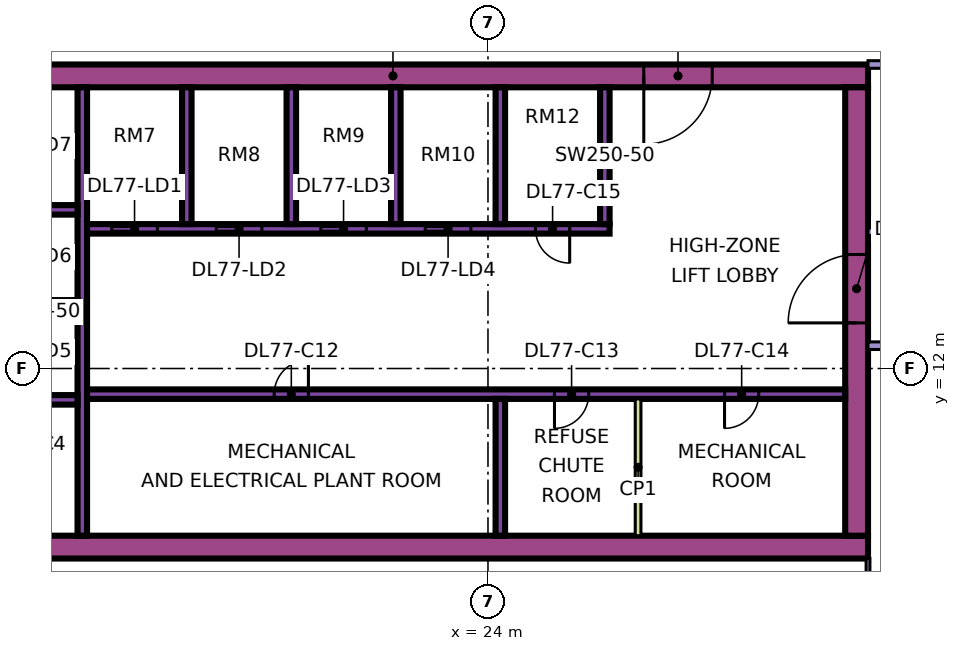
"""IFC4 building model, lengths in metres.
Left out: names, types, materials, properties, quantities, classifications, styles, units other than length and angle.
Written with IfcOpenShell. Run it as: python <this file> out.ifc"""

import sys

from ifc_helpers import new_model, si_unit, direction, frame, frame_2d, origin, place, context, subcontext, project, spatial, rectangle, extrude, element, fill, save


model = new_model("IFC4")
c1 = context("Model", 3, precision=1e-05, world=origin(), true_north=direction((0.0, 1.0)))
c2 = subcontext(c1, "Body", "Model", "MODEL_VIEW")
j1 = project(units=[si_unit("LENGTHUNIT", "METRE"), si_unit("PLANEANGLEUNIT", "RADIAN")], contexts=[c1])
p1 = place(None, origin())
s1 = spatial("IfcSite", under=j1, at=p1, CompositionType="ELEMENT")
p2 = place(p1, origin())
s2 = spatial("IfcBuilding", under=s1, at=p2, CompositionType="ELEMENT")
p3 = place(p2, frame((0.0, 0.0, 327.65)))
s3 = spatial("IfcBuildingStorey", under=s2, at=p3, CompositionType="ELEMENT", Elevation=327.65)
p4 = place(p3, frame((9.0, 7.3, 0.0), z_axis=(0.0, 0.0, 1.0), x_axis=(1.0, 0.0, 0.0)))
e1 = element("IfcWall", 1, at=p4, inside=s3, PredefinedType="SHEAR", context=c2, shape_type="SweptSolid", body=[
    extrude(rectangle(XDim=25.0, YDim=0.6, at=frame_2d((12.5, 0.0))), origin(), (0.0, 0.0, 1.0), 11.25),
])
p5 = place(p3, frame((9.0, 19.7, 0.0), z_axis=(0.0, 0.0, 1.0), x_axis=(1.0, 0.0, 0.0)))
e2 = element("IfcWall", 2, at=p5, inside=s3, PredefinedType="SHEAR", context=c2, shape_type="SweptSolid", body=[
    extrude(rectangle(XDim=25.0, YDim=0.6, at=frame_2d((12.5, 0.0))), origin(), (0.0, 0.0, 1.0), 11.25),
])
p6 = place(p5, frame((19.1, 0.0, 0.0)))
e3 = element("IfcOpeningElement", 3, at=p6, cuts=e2, PredefinedType="OPENING", context=c2, shape_type="SweptSolid", body=[
    extrude(rectangle(XDim=1.8, YDim=2.4, at=frame_2d((0.9, 1.2))), frame((0.0, 0.31, 0.0), z_axis=(0.0, -1.0, 0.0), x_axis=(1.0, 0.0, 0.0)), (0.0, 0.0, 1.0), 0.62),
])
p7 = place(p3, frame((33.7, 7.6, 0.0), z_axis=(0.0, 0.0, 1.0), x_axis=(0.0, 1.0, 0.0)))
e4 = element("IfcWall", 4, at=p7, inside=s3, PredefinedType="SHEAR", context=c2, shape_type="SweptSolid", body=[
    extrude(rectangle(XDim=11.8, YDim=0.6, at=frame_2d((5.9, 0.0))), origin(), (0.0, 0.0, 1.0), 11.25),
])
p8 = place(p7, frame((5.6, 0.0, 0.0)))
e5 = element("IfcOpeningElement", 5, at=p8, cuts=e4, PredefinedType="OPENING", context=c2, shape_type="SweptSolid", body=[
    extrude(rectangle(XDim=1.8, YDim=2.4, at=frame_2d((0.9, 1.2))), frame((0.0, 0.31, 0.0), z_axis=(0.0, -1.0, 0.0), x_axis=(1.0, 0.0, 0.0)), (0.0, 0.0, 1.0), 0.62),
])
p9 = place(p3, frame((13.325, 7.6, 0.0), z_axis=(0.0, 0.0, 1.0), x_axis=(0.0, 1.0, 0.0)))
e6 = element("IfcWall", 6, at=p9, inside=s3, PredefinedType="SHEAR", context=c2, shape_type="SweptSolid", body=[
    extrude(rectangle(XDim=11.8, YDim=0.25, at=frame_2d((5.9, 0.0))), origin(), (0.0, 0.0, 1.0), 11.25),
])
p10 = place(p3, frame((13.45, 11.325, 0.0), z_axis=(0.0, 0.0, 1.0), x_axis=(1.0, 0.0, 0.0)))
e7 = element("IfcWall", 7, at=p10, inside=s3, PredefinedType="SHEAR", context=c2, shape_type="SweptSolid", body=[
    extrude(rectangle(XDim=19.95, YDim=0.25, at=frame_2d((9.975, 0.0))), origin(), (0.0, 0.0, 1.0), 11.25),
])
p11 = place(p10, frame((4.925, 0.0, 0.0)))
e8 = element("IfcOpeningElement", 8, at=p11, cuts=e7, PredefinedType="OPENING", context=c2, shape_type="SweptSolid", body=[
    extrude(rectangle(XDim=0.9, YDim=2.1, at=frame_2d((0.45, 1.05))), frame((0.0, 0.135, 0.0), z_axis=(0.0, -1.0, 0.0), x_axis=(1.0, 0.0, 0.0)), (0.0, 0.0, 1.0), 0.27),
])
p12 = place(p10, frame((12.3, 0.0, 0.0)))
e9 = element("IfcOpeningElement", 9, at=p12, cuts=e7, PredefinedType="OPENING", context=c2, shape_type="SweptSolid", body=[
    extrude(rectangle(XDim=0.9, YDim=2.1, at=frame_2d((0.45, 1.05))), frame((0.0, 0.135, 0.0), z_axis=(0.0, -1.0, 0.0), x_axis=(1.0, 0.0, 0.0)), (0.0, 0.0, 1.0), 0.27),
])
p13 = place(p10, frame((16.775, 0.0, 0.0)))
e10 = element("IfcOpeningElement", 10, at=p13, cuts=e7, PredefinedType="OPENING", context=c2, shape_type="SweptSolid", body=[
    extrude(rectangle(XDim=0.9, YDim=2.1, at=frame_2d((0.45, 1.05))), frame((0.0, 0.135, 0.0), z_axis=(0.0, -1.0, 0.0), x_axis=(1.0, 0.0, 0.0)), (0.0, 0.0, 1.0), 0.27),
])
p14 = place(p3, frame((13.45, 15.675, 0.0), z_axis=(0.0, 0.0, 1.0), x_axis=(1.0, 0.0, 0.0)))
e11 = element("IfcWall", 11, at=p14, inside=s3, PredefinedType="SHEAR", context=c2, shape_type="SweptSolid", body=[
    extrude(rectangle(XDim=13.75, YDim=0.25, at=frame_2d((6.875, 0.0))), origin(), (0.0, 0.0, 1.0), 11.25),
])
p15 = place(p14, frame((0.65, 0.0, 0.0)))
e12 = element("IfcOpeningElement", 12, at=p15, cuts=e11, PredefinedType="OPENING", context=c2, shape_type="SweptSolid", body=[
    extrude(rectangle(XDim=1.2, YDim=2.2, at=frame_2d((0.6, 1.1))), frame((0.0, 0.135, 0.0), z_axis=(0.0, -1.0, 0.0), x_axis=(1.0, 0.0, 0.0)), (0.0, 0.0, 1.0), 0.27),
])
p16 = place(p14, frame((3.4, 0.0, 0.0)))
e13 = element("IfcOpeningElement", 13, at=p16, cuts=e11, PredefinedType="OPENING", context=c2, shape_type="SweptSolid", body=[
    extrude(rectangle(XDim=1.2, YDim=2.2, at=frame_2d((0.6, 1.1))), frame((0.0, 0.135, 0.0), z_axis=(0.0, -1.0, 0.0), x_axis=(1.0, 0.0, 0.0)), (0.0, 0.0, 1.0), 0.27),
])
p17 = place(p14, frame((6.15, 0.0, 0.0)))
e14 = element("IfcOpeningElement", 14, at=p17, cuts=e11, PredefinedType="OPENING", context=c2, shape_type="SweptSolid", body=[
    extrude(rectangle(XDim=1.2, YDim=2.2, at=frame_2d((0.6, 1.1))), frame((0.0, 0.135, 0.0), z_axis=(0.0, -1.0, 0.0), x_axis=(1.0, 0.0, 0.0)), (0.0, 0.0, 1.0), 0.27),
])
p18 = place(p14, frame((8.9, 0.0, 0.0)))
e15 = element("IfcOpeningElement", 15, at=p18, cuts=e11, PredefinedType="OPENING", context=c2, shape_type="SweptSolid", body=[
    extrude(rectangle(XDim=1.2, YDim=2.2, at=frame_2d((0.6, 1.1))), frame((0.0, 0.135, 0.0), z_axis=(0.0, -1.0, 0.0), x_axis=(1.0, 0.0, 0.0)), (0.0, 0.0, 1.0), 0.27),
])
p19 = place(p14, frame((11.8, 0.0, 0.0)))
e16 = element("IfcOpeningElement", 16, at=p19, cuts=e11, PredefinedType="OPENING", context=c2, shape_type="SweptSolid", body=[
    extrude(rectangle(XDim=0.9, YDim=2.1, at=frame_2d((0.45, 1.05))), frame((0.0, 0.135, 0.0), z_axis=(0.0, -1.0, 0.0), x_axis=(1.0, 0.0, 0.0)), (0.0, 0.0, 1.0), 0.27),
])
for number, where, z_axis, x_axis in (
    (17, (10.2, 11.175, 0.0), (0.0, 0.0, 1.0), (1.0, 0.0, 0.0)),
    (18, (10.2, 13.675, 0.0), (0.0, 0.0, 1.0), (1.0, 0.0, 0.0)),
    (19, (10.2, 16.175, 0.0), (0.0, 0.0, 1.0), (1.0, 0.0, 0.0)),
):
    element("IfcWall", number, at=place(p3, frame(where, z_axis=z_axis, x_axis=x_axis)), inside=s3, PredefinedType="SHEAR", context=c2, shape_type="SweptSolid", body=[
        extrude(rectangle(XDim=3.0, YDim=0.25, at=frame_2d((1.5, 0.0))), origin(), (0.0, 0.0, 1.0), 11.25),
    ])
for number, where, z_axis, x_axis in (
    (20, (24.325, 7.6, 0.0), (0.0, 0.0, 1.0), (0.0, 1.0, 0.0)),
    (21, (16.075, 15.8, 0.0), (0.0, 0.0, 1.0), (0.0, 1.0, 0.0)),
    (22, (18.825, 15.8, 0.0), (0.0, 0.0, 1.0), (0.0, 1.0, 0.0)),
    (23, (21.575, 15.8, 0.0), (0.0, 0.0, 1.0), (0.0, 1.0, 0.0)),
    (24, (24.325, 15.8, 0.0), (0.0, 0.0, 1.0), (0.0, 1.0, 0.0)),
    (25, (27.075, 15.8, 0.0), (0.0, 0.0, 1.0), (0.0, 1.0, 0.0)),
):
    element("IfcWall", number, at=place(p3, frame(where, z_axis=z_axis, x_axis=x_axis)), inside=s3, PredefinedType="SHEAR", context=c2, shape_type="SweptSolid", body=[
        extrude(rectangle(XDim=3.6, YDim=0.25, at=frame_2d((1.8, 0.0))), origin(), (0.0, 0.0, 1.0), 11.25),
    ])
p20 = place(p3, frame((-1.447, 12.553, 0.0), z_axis=(0.0, 0.0, 1.0), x_axis=(0.707106781187, -0.707106781187, 0.0)))
e26 = element("IfcWall", 26, at=p20, inside=s3, PredefinedType="SOLIDWALL", context=c2, shape_type="SweptSolid", body=[
    extrude(rectangle(XDim=19.799, YDim=0.15, at=frame_2d((9.899, 0.0))), origin(), (0.0, 0.0, 1.0), 10.85),
])
p21 = place(p20, frame((8.399, 0.0, 0.45)))
e27 = element("IfcOpeningElement", 27, at=p21, cuts=e26, PredefinedType="OPENING", context=c2, shape_type="SweptSolid", body=[
    extrude(rectangle(XDim=3.0, YDim=9.8, at=frame_2d((1.5, 4.9))), frame((0.0, 0.085, 0.0), z_axis=(0.0, -1.0, 0.0), x_axis=(1.0, 0.0, 0.0)), (0.0, 0.0, 1.0), 0.17),
])
p22 = place(p3, frame((27.95, 7.6, 0.0), z_axis=(0.0, 0.0, 1.0), x_axis=(0.0, 1.0, 0.0)))
e28 = element("IfcWall", 28, at=p22, inside=s3, PredefinedType="PARTITIONING", context=c2, shape_type="SweptSolid", body=[
    extrude(rectangle(XDim=3.6, YDim=0.15, at=frame_2d((1.8, 0.0))), origin(), (0.0, 0.0, 1.0), 10.85),
])
p23 = place(p3, frame((34.0, 0.0, 0.0), z_axis=(0.0, 0.0, 1.0), x_axis=(0.0, 1.0, 0.0)))
e29 = element("IfcWall", 29, at=p23, inside=s3, PredefinedType="PARTITIONING", context=c2, shape_type="SweptSolid", body=[
    extrude(rectangle(XDim=7.0, YDim=0.1, at=frame_2d((3.5, 0.0))), origin(), (0.0, 0.0, 1.0), 10.85),
])
p24 = place(p3, frame((34.0, 12.6, 0.0), z_axis=(0.0, 0.0, 1.0), x_axis=(1.0, 0.0, 0.0)))
e30 = element("IfcWall", 30, at=p24, inside=s3, PredefinedType="PARTITIONING", context=c2, shape_type="SweptSolid", body=[
    extrude(rectangle(XDim=3.2, YDim=0.2, at=frame_2d((1.6, 0.0))), origin(), (0.0, 0.0, 1.0), 10.85),
])
p25 = place(p3, frame((34.0, 15.6, 0.0), z_axis=(0.0, 0.0, 1.0), x_axis=(1.0, 0.0, 0.0)))
e31 = element("IfcWall", 31, at=p25, inside=s3, PredefinedType="PARTITIONING", context=c2, shape_type="SweptSolid", body=[
    extrude(rectangle(XDim=10.35, YDim=0.2, at=frame_2d((5.175, 0.0))), origin(), (0.0, 0.0, 1.0), 10.85),
])
p26 = place(p25, frame((3.6, 0.0, 0.0)))
e32 = element("IfcOpeningElement", 32, at=p26, cuts=e31, PredefinedType="OPENING", context=c2, shape_type="SweptSolid", body=[
    extrude(rectangle(XDim=1.0, YDim=2.1, at=frame_2d((0.5, 1.05))), frame((0.0, 0.11, 0.0), z_axis=(0.0, -1.0, 0.0), x_axis=(1.0, 0.0, 0.0)), (0.0, 0.0, 1.0), 0.22),
])
p27 = place(p3, frame((34.0, 20.0, 0.0), z_axis=(0.0, 0.0, 1.0), x_axis=(1.0, 0.0, 0.0)))
e33 = element("IfcWall", 33, at=p27, inside=s3, PredefinedType="PARTITIONING", context=c2, shape_type="SweptSolid", body=[
    extrude(rectangle(XDim=1.9, YDim=0.2, at=frame_2d((0.95, 0.0))), origin(), (0.0, 0.0, 1.0), 10.85),
])
p28 = place(p15, origin())
e34 = element("IfcDoor", 34, at=p28, inside=s3, OperationType="DOUBLE_DOOR_SLIDING", PredefinedType="DOOR", context=c2, shape_type="SweptSolid", body=[
    extrude(rectangle(XDim=1.2, YDim=2.2, at=frame_2d((0.6, 1.1))), frame((0.0, 0.025, 0.0), z_axis=(0.0, -1.0, 0.0), x_axis=(1.0, 0.0, 0.0)), (0.0, 0.0, 1.0), 0.05),
])
fill(e12, e34)
p29 = place(p16, origin())
e35 = element("IfcDoor", 35, at=p29, inside=s3, OperationType="DOUBLE_DOOR_SLIDING", PredefinedType="DOOR", context=c2, shape_type="SweptSolid", body=[
    extrude(rectangle(XDim=1.2, YDim=2.2, at=frame_2d((0.6, 1.1))), frame((0.0, 0.025, 0.0), z_axis=(0.0, -1.0, 0.0), x_axis=(1.0, 0.0, 0.0)), (0.0, 0.0, 1.0), 0.05),
])
fill(e13, e35)
p30 = place(p17, origin())
e36 = element("IfcDoor", 36, at=p30, inside=s3, OperationType="DOUBLE_DOOR_SLIDING", PredefinedType="DOOR", context=c2, shape_type="SweptSolid", body=[
    extrude(rectangle(XDim=1.2, YDim=2.2, at=frame_2d((0.6, 1.1))), frame((0.0, 0.025, 0.0), z_axis=(0.0, -1.0, 0.0), x_axis=(1.0, 0.0, 0.0)), (0.0, 0.0, 1.0), 0.05),
])
fill(e14, e36)
p31 = place(p18, origin())
e37 = element("IfcDoor", 37, at=p31, inside=s3, OperationType="DOUBLE_DOOR_SLIDING", PredefinedType="DOOR", context=c2, shape_type="SweptSolid", body=[
    extrude(rectangle(XDim=1.2, YDim=2.2, at=frame_2d((0.6, 1.1))), frame((0.0, 0.025, 0.0), z_axis=(0.0, -1.0, 0.0), x_axis=(1.0, 0.0, 0.0)), (0.0, 0.0, 1.0), 0.05),
])
fill(e15, e37)
p32 = place(p8, origin())
e38 = element("IfcDoor", 38, at=p32, inside=s3, OperationType="DOUBLE_DOOR_SINGLE_SWING", PredefinedType="DOOR", context=c2, shape_type="SweptSolid", body=[
    extrude(rectangle(XDim=1.8, YDim=2.4, at=frame_2d((0.9, 1.2))), frame((0.0, 0.025, 0.0), z_axis=(0.0, -1.0, 0.0), x_axis=(1.0, 0.0, 0.0)), (0.0, 0.0, 1.0), 0.05),
])
fill(e5, e38)
p33 = place(p6, frame((1.8, 0.0, 0.0), z_axis=(0.0, 0.0, 1.0), x_axis=(-1.0, 0.0, 0.0)))
e39 = element("IfcDoor", 39, at=p33, inside=s3, OperationType="DOUBLE_DOOR_SINGLE_SWING", PredefinedType="DOOR", context=c2, shape_type="SweptSolid", body=[
    extrude(rectangle(XDim=1.8, YDim=2.4, at=frame_2d((0.9, 1.2))), frame((0.0, 0.025, 0.0), z_axis=(0.0, -1.0, 0.0), x_axis=(1.0, 0.0, 0.0)), (0.0, 0.0, 1.0), 0.05),
])
fill(e3, e39)
p34 = place(p11, frame((0.9, 0.0, 0.0), z_axis=(0.0, 0.0, 1.0), x_axis=(-1.0, 0.0, 0.0)))
e40 = element("IfcDoor", 40, at=p34, inside=s3, OperationType="SINGLE_SWING_RIGHT", PredefinedType="DOOR", context=c2, shape_type="SweptSolid", body=[
    extrude(rectangle(XDim=0.9, YDim=2.1, at=frame_2d((0.45, 1.05))), frame((0.0, 0.025, 0.0), z_axis=(0.0, -1.0, 0.0), x_axis=(1.0, 0.0, 0.0)), (0.0, 0.0, 1.0), 0.05),
])
fill(e8, e40)
p35 = place(p12, frame((0.9, 0.0, 0.0), z_axis=(0.0, 0.0, 1.0), x_axis=(-1.0, 0.0, 0.0)))
e41 = element("IfcDoor", 41, at=p35, inside=s3, OperationType="SINGLE_SWING_LEFT", PredefinedType="DOOR", context=c2, shape_type="SweptSolid", body=[
    extrude(rectangle(XDim=0.9, YDim=2.1, at=frame_2d((0.45, 1.05))), frame((0.0, 0.025, 0.0), z_axis=(0.0, -1.0, 0.0), x_axis=(1.0, 0.0, 0.0)), (0.0, 0.0, 1.0), 0.05),
])
fill(e9, e41)
p36 = place(p13, frame((0.9, 0.0, 0.0), z_axis=(0.0, 0.0, 1.0), x_axis=(-1.0, 0.0, 0.0)))
e42 = element("IfcDoor", 42, at=p36, inside=s3, OperationType="SINGLE_SWING_LEFT", PredefinedType="DOOR", context=c2, shape_type="SweptSolid", body=[
    extrude(rectangle(XDim=0.9, YDim=2.1, at=frame_2d((0.45, 1.05))), frame((0.0, 0.025, 0.0), z_axis=(0.0, -1.0, 0.0), x_axis=(1.0, 0.0, 0.0)), (0.0, 0.0, 1.0), 0.05),
])
fill(e10, e42)
p37 = place(p19, origin())
e43 = element("IfcDoor", 43, at=p37, inside=s3, OperationType="SINGLE_SWING_RIGHT", PredefinedType="DOOR", context=c2, shape_type="SweptSolid", body=[
    extrude(rectangle(XDim=0.9, YDim=2.1, at=frame_2d((0.45, 1.05))), frame((0.0, 0.025, 0.0), z_axis=(0.0, -1.0, 0.0), x_axis=(1.0, 0.0, 0.0)), (0.0, 0.0, 1.0), 0.05),
])
fill(e16, e43)
save(model, sys.argv[1])
